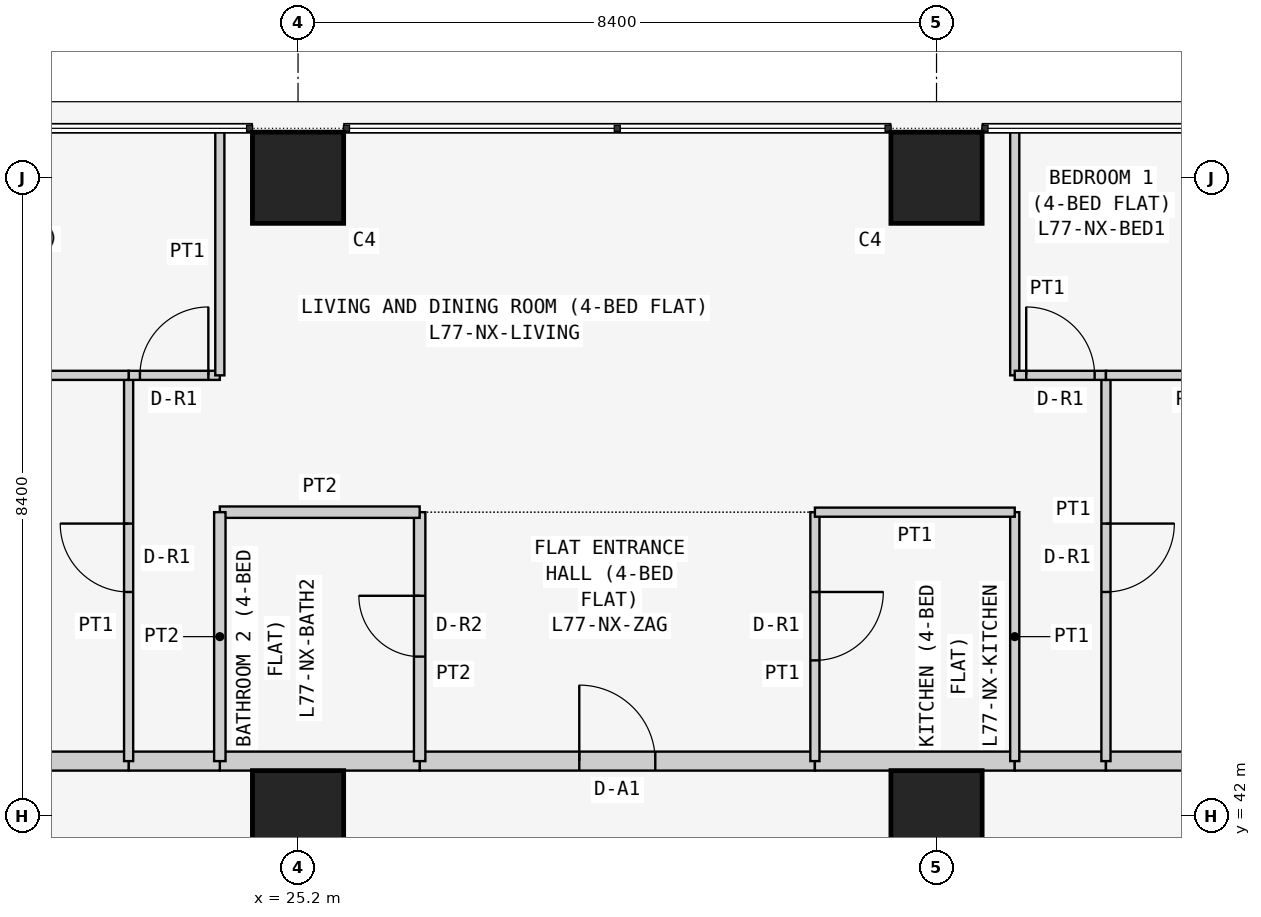
"""IFC4 building model, lengths in metres.
Left out: names, types, materials, properties, quantities, classifications, styles, units other than length and angle.
Written with IfcOpenShell. Run it as: python <this file> out.ifc"""

import sys

from ifc_helpers import new_model, si_unit, direction, frame, frame_2d, origin, origin_2d, place, context, subcontext, project, spatial, rectangle, extrude, element, fill, save


model = new_model("IFC4")
c1 = context("Model", 3, precision=1e-05, world=origin(), true_north=direction((0.0, 1.0)))
c2 = subcontext(c1, "Body", "Model", "MODEL_VIEW")
j1 = project(units=[si_unit("LENGTHUNIT", "METRE"), si_unit("PLANEANGLEUNIT", "RADIAN")], contexts=[c1])
p1 = place(None, origin())
s1 = spatial("IfcSite", under=j1, at=p1, CompositionType="ELEMENT")
p2 = place(p1, origin())
s2 = spatial("IfcBuilding", under=s1, at=p2, CompositionType="ELEMENT")
p3 = place(p2, frame((0.0, 0.0, 293.7)))
s3 = spatial("IfcBuildingStorey", under=s2, at=p3, CompositionType="ELEMENT", Elevation=293.7)
for number, where, z_axis, x_axis in (
    (1, (25.2, 42.0, 0.0), (0.0, 0.0, 1.0), (1.0, 0.0, 0.0)),
    (2, (25.2, 50.4, 0.0), (0.0, 0.0, 1.0), (1.0, 0.0, 0.0)),
    (3, (33.6, 42.0, 0.0), (0.0, 0.0, 1.0), (1.0, 0.0, 0.0)),
    (4, (33.6, 50.4, 0.0), (0.0, 0.0, 1.0), (1.0, 0.0, 0.0)),
):
    element("IfcColumn", number, at=place(p3, frame(where, z_axis=z_axis, x_axis=x_axis)), inside=s3, PredefinedType="COLUMN", context=c2, shape_type="SweptSolid", body=[
        extrude(rectangle(XDim=1.2, YDim=1.2, at=origin_2d()), origin(), (0.0, 0.0, 1.0), 3.6),
    ])
p4 = place(p3, frame((26.8, 42.725, 0.0), z_axis=(0.0, 0.0, 1.0), x_axis=(1.0, 0.0, 0.0)))
e5 = element("IfcWall", 5, at=p4, inside=s3, PredefinedType="PARTITIONING", context=c2, shape_type="SweptSolid", body=[
    extrude(rectangle(XDim=5.2, YDim=0.25, at=frame_2d((2.6, 0.0))), origin(), (0.0, 0.0, 1.0), 3.45),
])
p5 = place(p4, frame((2.1, 0.0, 0.0)))
e6 = element("IfcOpeningElement", 6, at=p5, cuts=e5, PredefinedType="OPENING", context=c2, shape_type="SweptSolid", body=[
    extrude(rectangle(XDim=1.0, YDim=2.1, at=frame_2d((0.5, 1.05))), frame((0.0, 0.135, 0.0), z_axis=(0.0, -1.0, 0.0), x_axis=(1.0, 0.0, 0.0)), (0.0, 0.0, 1.0), 0.27),
])
p6 = place(p3, frame((24.171, 42.725, 0.0), z_axis=(0.0, 0.0, 1.0), x_axis=(1.0, 0.0, 0.0)))
e7 = element("IfcWall", 7, at=p6, inside=s3, PredefinedType="PARTITIONING", context=c2, shape_type="SweptSolid", body=[
    extrude(rectangle(XDim=2.629, YDim=0.25, at=frame_2d((1.314, 0.0))), origin(), (0.0, 0.0, 1.0), 3.45),
])
p7 = place(p3, frame((32.0, 42.725, 0.0), z_axis=(0.0, 0.0, 1.0), x_axis=(1.0, 0.0, 0.0)))
e8 = element("IfcWall", 8, at=p7, inside=s3, PredefinedType="PARTITIONING", context=c2, shape_type="SweptSolid", body=[
    extrude(rectangle(XDim=2.629, YDim=0.25, at=frame_2d((1.314, 0.0))), origin(), (0.0, 0.0, 1.0), 3.45),
])
p8 = place(p3, frame((22.971, 42.725, 0.0), z_axis=(0.0, 0.0, 1.0), x_axis=(1.0, 0.0, 0.0)))
e9 = element("IfcWall", 9, at=p8, inside=s3, PredefinedType="PARTITIONING", context=c2, shape_type="SweptSolid", body=[
    extrude(rectangle(XDim=1.2, YDim=0.25, at=frame_2d((0.6, 0.0))), origin(), (0.0, 0.0, 1.0), 3.45),
])
p9 = place(p3, frame((34.629, 42.725, 0.0), z_axis=(0.0, 0.0, 1.0), x_axis=(1.0, 0.0, 0.0)))
e10 = element("IfcWall", 10, at=p9, inside=s3, PredefinedType="PARTITIONING", context=c2, shape_type="SweptSolid", body=[
    extrude(rectangle(XDim=1.2, YDim=0.25, at=frame_2d((0.6, 0.0))), origin(), (0.0, 0.0, 1.0), 3.45),
])
for number, where, z_axis, x_axis in (
    (11, (16.1, 42.725, 0.0), (0.0, 0.0, 1.0), (1.0, 0.0, 0.0)),
    (12, (35.829, 42.725, 0.0), (0.0, 0.0, 1.0), (1.0, 0.0, 0.0)),
):
    element("IfcWall", number, at=place(p3, frame(where, z_axis=z_axis, x_axis=x_axis)), inside=s3, PredefinedType="PARTITIONING", context=c2, shape_type="SweptSolid", body=[
        extrude(rectangle(XDim=6.871, YDim=0.25, at=frame_2d((3.436, 0.0))), origin(), (0.0, 0.0, 1.0), 3.45),
    ])
p10 = place(p3, frame((26.8, 46.0, 0.0), z_axis=(0.0, 0.0, 1.0), x_axis=(0.0, -1.0, 0.0)))
e13 = element("IfcWall", 13, at=p10, inside=s3, PredefinedType="PARTITIONING", context=c2, shape_type="SweptSolid", body=[
    extrude(rectangle(XDim=3.275, YDim=0.15, at=frame_2d((1.637, 0.0))), origin(), (0.0, 0.0, 1.0), 3.45),
])
p11 = place(p10, frame((1.1, 0.0, 0.0)))
e14 = element("IfcOpeningElement", 14, at=p11, cuts=e13, PredefinedType="OPENING", context=c2, shape_type="SweptSolid", body=[
    extrude(rectangle(XDim=0.8, YDim=2.1, at=frame_2d((0.4, 1.05))), frame((0.0, 0.085, 0.0), z_axis=(0.0, -1.0, 0.0), x_axis=(1.0, 0.0, 0.0)), (0.0, 0.0, 1.0), 0.17),
])
p12 = place(p3, frame((32.0, 42.725, 0.0), z_axis=(0.0, 0.0, 1.0), x_axis=(0.0, 1.0, 0.0)))
e15 = element("IfcWall", 15, at=p12, inside=s3, PredefinedType="PARTITIONING", context=c2, shape_type="SweptSolid", body=[
    extrude(rectangle(XDim=3.275, YDim=0.12, at=frame_2d((1.637, 0.0))), origin(), (0.0, 0.0, 1.0), 3.45),
])
p13 = place(p12, frame((1.325, 0.0, 0.0)))
e16 = element("IfcOpeningElement", 16, at=p13, cuts=e15, PredefinedType="OPENING", context=c2, shape_type="SweptSolid", body=[
    extrude(rectangle(XDim=0.9, YDim=2.1, at=frame_2d((0.45, 1.05))), frame((0.0, 0.07, 0.0), z_axis=(0.0, -1.0, 0.0), x_axis=(1.0, 0.0, 0.0)), (0.0, 0.0, 1.0), 0.14),
])
p14 = place(p3, frame((26.8, 46.0, 0.0), z_axis=(0.0, 0.0, 1.0), x_axis=(-1.0, 0.0, 0.0)))
e17 = element("IfcWall", 17, at=p14, inside=s3, PredefinedType="PARTITIONING", context=c2, shape_type="SweptSolid", body=[
    extrude(rectangle(XDim=2.629, YDim=0.15, at=frame_2d((1.314, 0.0))), origin(), (0.0, 0.0, 1.0), 3.45),
])
p15 = place(p3, frame((24.171, 46.0, 0.0), z_axis=(0.0, 0.0, 1.0), x_axis=(0.0, -1.0, 0.0)))
e18 = element("IfcWall", 18, at=p15, inside=s3, PredefinedType="PARTITIONING", context=c2, shape_type="SweptSolid", body=[
    extrude(rectangle(XDim=3.275, YDim=0.15, at=frame_2d((1.637, 0.0))), origin(), (0.0, 0.0, 1.0), 3.45),
])
p16 = place(p3, frame((34.629, 42.725, 0.0), z_axis=(0.0, 0.0, 1.0), x_axis=(0.0, 1.0, 0.0)))
e19 = element("IfcWall", 19, at=p16, inside=s3, PredefinedType="PARTITIONING", context=c2, shape_type="SweptSolid", body=[
    extrude(rectangle(XDim=3.275, YDim=0.12, at=frame_2d((1.637, 0.0))), origin(), (0.0, 0.0, 1.0), 3.45),
])
p17 = place(p3, frame((34.629, 46.0, 0.0), z_axis=(0.0, 0.0, 1.0), x_axis=(-1.0, 0.0, 0.0)))
e20 = element("IfcWall", 20, at=p17, inside=s3, PredefinedType="PARTITIONING", context=c2, shape_type="SweptSolid", body=[
    extrude(rectangle(XDim=2.629, YDim=0.12, at=frame_2d((1.314, 0.0))), origin(), (0.0, 0.0, 1.0), 3.45),
])
p18 = place(p3, frame((22.971, 42.725, 0.0), z_axis=(0.0, 0.0, 1.0), x_axis=(0.0, 1.0, 0.0)))
e21 = element("IfcWall", 21, at=p18, inside=s3, PredefinedType="PARTITIONING", context=c2, shape_type="SweptSolid", body=[
    extrude(rectangle(XDim=5.075, YDim=0.12, at=frame_2d((2.538, 0.0))), origin(), (0.0, 0.0, 1.0), 3.45),
])
p19 = place(p18, frame((2.225, 0.0, 0.0)))
e22 = element("IfcOpeningElement", 22, at=p19, cuts=e21, PredefinedType="OPENING", context=c2, shape_type="SweptSolid", body=[
    extrude(rectangle(XDim=0.9, YDim=2.1, at=frame_2d((0.45, 1.05))), frame((0.0, 0.07, 0.0), z_axis=(0.0, -1.0, 0.0), x_axis=(1.0, 0.0, 0.0)), (0.0, 0.0, 1.0), 0.14),
])
p20 = place(p3, frame((22.971, 47.8, 0.0), z_axis=(0.0, 0.0, 1.0), x_axis=(1.0, 0.0, 0.0)))
e23 = element("IfcWall", 23, at=p20, inside=s3, PredefinedType="PARTITIONING", context=c2, shape_type="SweptSolid", body=[
    extrude(rectangle(XDim=1.2, YDim=0.12, at=frame_2d((0.6, 0.0))), origin(), (0.0, 0.0, 1.0), 3.45),
])
p21 = place(p20, frame((0.149, 0.0, 0.0)))
e24 = element("IfcOpeningElement", 24, at=p21, cuts=e23, PredefinedType="OPENING", context=c2, shape_type="SweptSolid", body=[
    extrude(rectangle(XDim=0.9, YDim=2.1, at=frame_2d((0.45, 1.05))), frame((0.0, 0.07, 0.0), z_axis=(0.0, -1.0, 0.0), x_axis=(1.0, 0.0, 0.0)), (0.0, 0.0, 1.0), 0.14),
])
p22 = place(p3, frame((24.171, 47.8, 0.0), z_axis=(0.0, 0.0, 1.0), x_axis=(0.0, 1.0, 0.0)))
e25 = element("IfcWall", 25, at=p22, inside=s3, PredefinedType="PARTITIONING", context=c2, shape_type="SweptSolid", body=[
    extrude(rectangle(XDim=3.25, YDim=0.12, at=frame_2d((1.625, 0.0))), origin(), (0.0, 0.0, 1.0), 3.45),
])
p23 = place(p3, frame((35.829, 47.8, 0.0), z_axis=(0.0, 0.0, 1.0), x_axis=(0.0, -1.0, 0.0)))
e26 = element("IfcWall", 26, at=p23, inside=s3, PredefinedType="PARTITIONING", context=c2, shape_type="SweptSolid", body=[
    extrude(rectangle(XDim=5.075, YDim=0.12, at=frame_2d((2.538, 0.0))), origin(), (0.0, 0.0, 1.0), 3.45),
])
p24 = place(p23, frame((1.95, 0.0, 0.0)))
e27 = element("IfcOpeningElement", 27, at=p24, cuts=e26, PredefinedType="OPENING", context=c2, shape_type="SweptSolid", body=[
    extrude(rectangle(XDim=0.9, YDim=2.1, at=frame_2d((0.45, 1.05))), frame((0.0, 0.07, 0.0), z_axis=(0.0, -1.0, 0.0), x_axis=(1.0, 0.0, 0.0)), (0.0, 0.0, 1.0), 0.14),
])
p25 = place(p3, frame((34.629, 51.05, 0.0), z_axis=(0.0, 0.0, 1.0), x_axis=(0.0, -1.0, 0.0)))
e28 = element("IfcWall", 28, at=p25, inside=s3, PredefinedType="PARTITIONING", context=c2, shape_type="SweptSolid", body=[
    extrude(rectangle(XDim=3.25, YDim=0.12, at=frame_2d((1.625, 0.0))), origin(), (0.0, 0.0, 1.0), 3.45),
])
p26 = place(p3, frame((34.629, 47.8, 0.0), z_axis=(0.0, 0.0, 1.0), x_axis=(1.0, 0.0, 0.0)))
e29 = element("IfcWall", 29, at=p26, inside=s3, PredefinedType="PARTITIONING", context=c2, shape_type="SweptSolid", body=[
    extrude(rectangle(XDim=1.2, YDim=0.12, at=frame_2d((0.6, 0.0))), origin(), (0.0, 0.0, 1.0), 3.45),
])
p27 = place(p26, frame((0.151, 0.0, 0.0)))
e30 = element("IfcOpeningElement", 30, at=p27, cuts=e29, PredefinedType="OPENING", context=c2, shape_type="SweptSolid", body=[
    extrude(rectangle(XDim=0.9, YDim=2.1, at=frame_2d((0.45, 1.05))), frame((0.0, 0.07, 0.0), z_axis=(0.0, -1.0, 0.0), x_axis=(1.0, 0.0, 0.0)), (0.0, 0.0, 1.0), 0.14),
])
p28 = place(p3, frame((22.971, 47.8, 0.0), z_axis=(0.0, 0.0, 1.0), x_axis=(-1.0, 0.0, 0.0)))
e31 = element("IfcWall", 31, at=p28, inside=s3, PredefinedType="PARTITIONING", context=c2, shape_type="SweptSolid", body=[
    extrude(rectangle(XDim=6.871, YDim=0.12, at=frame_2d((3.436, 0.0))), origin(), (0.0, 0.0, 1.0), 3.45),
])
p29 = place(p3, frame((38.114, 47.8, 0.0), z_axis=(0.0, 0.0, 1.0), x_axis=(-1.0, 0.0, 0.0)))
e32 = element("IfcWall", 32, at=p29, inside=s3, PredefinedType="PARTITIONING", context=c2, shape_type="SweptSolid", body=[
    extrude(rectangle(XDim=2.285, YDim=0.12, at=frame_2d((1.143, 0.0))), origin(), (0.0, 0.0, 1.0), 3.45),
])
p30 = place(p5, origin())
e33 = element("IfcDoor", 33, at=p30, inside=s3, OperationType="SINGLE_SWING_LEFT", PredefinedType="DOOR", context=c2, shape_type="SweptSolid", body=[
    extrude(rectangle(XDim=1.0, YDim=2.1, at=frame_2d((0.5, 1.05))), frame((0.0, 0.025, 0.0), z_axis=(0.0, -1.0, 0.0), x_axis=(1.0, 0.0, 0.0)), (0.0, 0.0, 1.0), 0.05),
])
fill(e6, e33)
p31 = place(p11, frame((0.8, 0.0, 0.0), z_axis=(0.0, 0.0, 1.0), x_axis=(-1.0, 0.0, 0.0)))
e34 = element("IfcDoor", 34, at=p31, inside=s3, OperationType="SINGLE_SWING_RIGHT", PredefinedType="DOOR", context=c2, shape_type="SweptSolid", body=[
    extrude(rectangle(XDim=0.8, YDim=2.1, at=frame_2d((0.4, 1.05))), frame((0.0, 0.025, 0.0), z_axis=(0.0, -1.0, 0.0), x_axis=(1.0, 0.0, 0.0)), (0.0, 0.0, 1.0), 0.05),
])
fill(e14, e34)
p32 = place(p13, frame((0.9, 0.0, 0.0), z_axis=(0.0, 0.0, 1.0), x_axis=(-1.0, 0.0, 0.0)))
e35 = element("IfcDoor", 35, at=p32, inside=s3, OperationType="SINGLE_SWING_LEFT", PredefinedType="DOOR", context=c2, shape_type="SweptSolid", body=[
    extrude(rectangle(XDim=0.9, YDim=2.1, at=frame_2d((0.45, 1.05))), frame((0.0, 0.025, 0.0), z_axis=(0.0, -1.0, 0.0), x_axis=(1.0, 0.0, 0.0)), (0.0, 0.0, 1.0), 0.05),
])
fill(e16, e35)
p33 = place(p19, origin())
e36 = element("IfcDoor", 36, at=p33, inside=s3, OperationType="SINGLE_SWING_RIGHT", PredefinedType="DOOR", context=c2, shape_type="SweptSolid", body=[
    extrude(rectangle(XDim=0.9, YDim=2.1, at=frame_2d((0.45, 1.05))), frame((0.0, 0.025, 0.0), z_axis=(0.0, -1.0, 0.0), x_axis=(1.0, 0.0, 0.0)), (0.0, 0.0, 1.0), 0.05),
])
fill(e22, e36)
p34 = place(p21, origin())
e37 = element("IfcDoor", 37, at=p34, inside=s3, OperationType="SINGLE_SWING_RIGHT", PredefinedType="DOOR", context=c2, shape_type="SweptSolid", body=[
    extrude(rectangle(XDim=0.9, YDim=2.1, at=frame_2d((0.45, 1.05))), frame((0.0, 0.025, 0.0), z_axis=(0.0, -1.0, 0.0), x_axis=(1.0, 0.0, 0.0)), (0.0, 0.0, 1.0), 0.05),
])
fill(e24, e37)
p35 = place(p24, origin())
e38 = element("IfcDoor", 38, at=p35, inside=s3, OperationType="SINGLE_SWING_LEFT", PredefinedType="DOOR", context=c2, shape_type="SweptSolid", body=[
    extrude(rectangle(XDim=0.9, YDim=2.1, at=frame_2d((0.45, 1.05))), frame((0.0, 0.025, 0.0), z_axis=(0.0, -1.0, 0.0), x_axis=(1.0, 0.0, 0.0)), (0.0, 0.0, 1.0), 0.05),
])
fill(e27, e38)
p36 = place(p27, origin())
e39 = element("IfcDoor", 39, at=p36, inside=s3, OperationType="SINGLE_SWING_LEFT", PredefinedType="DOOR", context=c2, shape_type="SweptSolid", body=[
    extrude(rectangle(XDim=0.9, YDim=2.1, at=frame_2d((0.45, 1.05))), frame((0.0, 0.025, 0.0), z_axis=(0.0, -1.0, 0.0), x_axis=(1.0, 0.0, 0.0)), (0.0, 0.0, 1.0), 0.05),
])
fill(e30, e39)
save(model, sys.argv[1])
